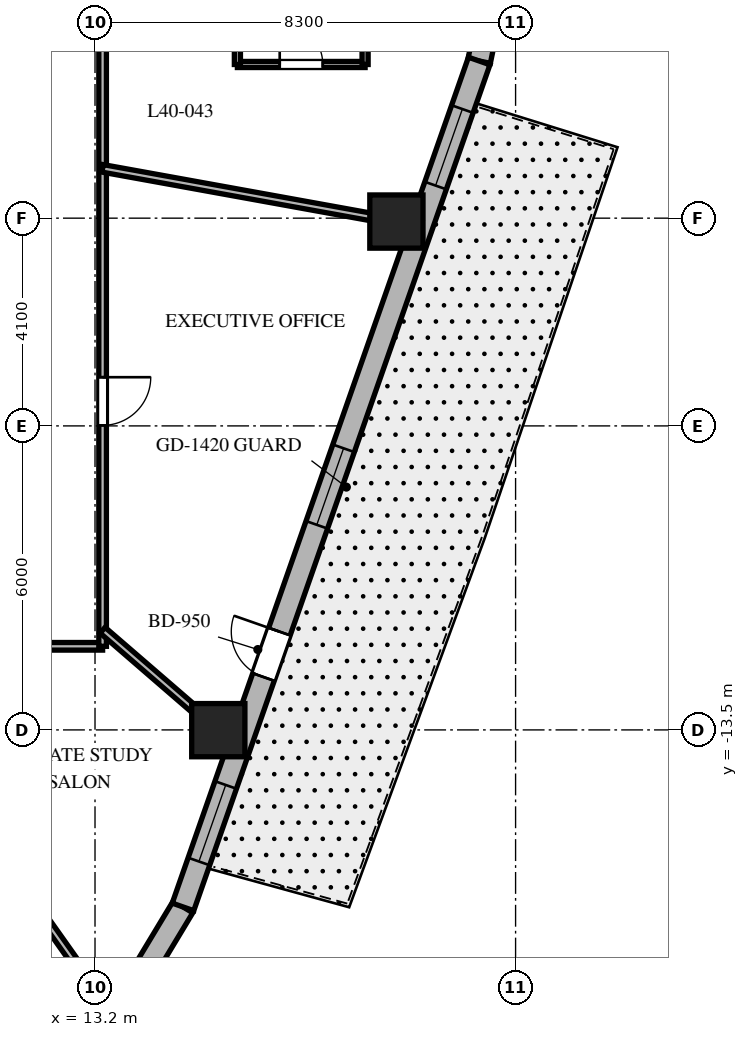
"""IFC4 building model, lengths in metres.
Left out: names, types, materials, properties, quantities, classifications, styles, units other than length and angle.
Written with IfcOpenShell. Run it as: python <this file> out.ifc"""

import sys

from ifc_helpers import new_model, si_unit, direction, frame, frame_2d, origin, origin_2d, place, context, subcontext, project, spatial, rectangle, extrude, element, fill, save


model = new_model("IFC4")
c1 = context("Model", 3, precision=1e-05, world=origin(), true_north=direction((0.0, 1.0)))
c2 = subcontext(c1, "Body", "Model", "MODEL_VIEW")
j1 = project(units=[si_unit("LENGTHUNIT", "METRE"), si_unit("PLANEANGLEUNIT", "RADIAN")], contexts=[c1])
p1 = place(None, origin())
s1 = spatial("IfcSite", under=j1, at=p1, CompositionType="ELEMENT")
p2 = place(p1, origin())
s2 = spatial("IfcBuilding", under=s1, at=p2, CompositionType="ELEMENT")
p3 = place(p2, frame((0.0, 0.0, 162.8)))
s3 = spatial("IfcBuildingStorey", under=s2, at=p3, CompositionType="ELEMENT", Elevation=162.8)
for number, where, z_axis, x_axis in (
    (1, (15.633, -13.505, 0.0), (0.0, 0.0, 1.0), (1.0, 0.0, 0.0)),
    (2, (19.148, -3.467, 0.0), (0.0, 0.0, 1.0), (1.0, 0.0, 0.0)),
):
    element("IfcColumn", number, at=place(p3, frame(where, z_axis=z_axis, x_axis=x_axis)), inside=s3, PredefinedType="COLUMN", context=c2, shape_type="SweptSolid", body=[
        extrude(rectangle(XDim=1.05, YDim=1.05, at=origin_2d()), origin(), (0.0, 0.0, 1.0), 3.7),
    ])
p4 = place(p3, frame((14.214, -18.192, 0.0), z_axis=(0.0, 0.0, 1.0), x_axis=(0.516340945502, 0.856383108193, 0.0)))
e3 = element("IfcWall", 3, at=p4, inside=s3, PredefinedType="SOLIDWALL", context=c2, shape_type="SweptSolid", body=[
    extrude(rectangle(XDim=1.4, YDim=0.45, at=frame_2d((0.7, 0.0))), origin(), (0.0, 0.0, 1.0), 3.4),
])
p5 = place(p3, frame((20.782, -0.298, 0.0), z_axis=(0.0, 0.0, 1.0), x_axis=(0.202570068411, 0.979267771033, 0.0)))
e4 = element("IfcWall", 4, at=p5, inside=s3, PredefinedType="SOLIDWALL", context=c2, shape_type="SweptSolid", body=[
    extrude(rectangle(XDim=0.909, YDim=0.45, at=frame_2d((0.454, 0.0))), origin(), (0.0, 0.0, 1.0), 3.4),
])
p6 = place(p3, frame((14.937, -16.993, 0.0), z_axis=(0.0, 0.0, 1.0), x_axis=(0.330431575061, 0.943829949834, 0.0)))
e5 = element("IfcWall", 5, at=p6, inside=s3, PredefinedType="SOLIDWALL", context=c2, shape_type="SweptSolid", body=[
    extrude(rectangle(XDim=17.689, YDim=0.45, at=frame_2d((8.844, 0.0))), origin(), (0.0, 0.0, 1.0), 3.4),
])
p7 = place(p6, frame((4.807, 0.0, 0.0)))
e6 = element("IfcOpeningElement", 6, at=p7, cuts=e5, PredefinedType="OPENING", context=c2, shape_type="SweptSolid", body=[
    extrude(rectangle(XDim=0.95, YDim=2.15, at=frame_2d((0.475, 1.075))), frame((0.0, 0.235, 0.0), z_axis=(0.0, -1.0, 0.0), x_axis=(1.0, 0.0, 0.0)), (0.0, 0.0, 1.0), 0.47),
])
p8 = place(p6, frame((0.95, 0.0, 0.8)))
e7 = element("IfcOpeningElement", 7, at=p8, cuts=e5, PredefinedType="OPENING", context=c2, shape_type="SweptSolid", body=[
    extrude(rectangle(XDim=1.6, YDim=1.75, at=frame_2d((0.8, 0.875))), frame((0.0, 0.235, 0.0), z_axis=(0.0, -1.0, 0.0), x_axis=(1.0, 0.0, 0.0)), (0.0, 0.0, 1.0), 0.47),
])
p9 = place(p6, frame((7.99, 0.0, 0.8)))
e8 = element("IfcOpeningElement", 8, at=p9, cuts=e5, PredefinedType="OPENING", context=c2, shape_type="SweptSolid", body=[
    extrude(rectangle(XDim=1.6, YDim=1.75, at=frame_2d((0.8, 0.875))), frame((0.0, 0.235, 0.0), z_axis=(0.0, -1.0, 0.0), x_axis=(1.0, 0.0, 0.0)), (0.0, 0.0, 1.0), 0.47),
])
p10 = place(p6, frame((15.084, 0.0, 0.8)))
e9 = element("IfcOpeningElement", 9, at=p10, cuts=e5, PredefinedType="OPENING", context=c2, shape_type="SweptSolid", body=[
    extrude(rectangle(XDim=1.6, YDim=1.75, at=frame_2d((0.8, 0.875))), frame((0.0, 0.235, 0.0), z_axis=(0.0, -1.0, 0.0), x_axis=(1.0, 0.0, 0.0)), (0.0, 0.0, 1.0), 0.47),
])
p11 = place(p3, frame((13.35, -11.85, 0.0), z_axis=(0.0, 0.0, 1.0), x_axis=(-1.0, 0.0, 0.0)))
e10 = element("IfcWall", 10, at=p11, inside=s3, PredefinedType="PARTITIONING", context=c2, shape_type="SweptSolid", body=[
    extrude(rectangle(XDim=26.7, YDim=0.15, at=frame_2d((13.35, 0.0))), origin(), (0.0, 0.0, 1.0), 2.84),
])
p12 = place(p11, frame((20.682, 0.0, 0.0)))
e11 = element("IfcOpeningElement", 11, at=p12, cuts=e10, PredefinedType="OPENING", context=c2, shape_type="SweptSolid", body=[
    extrude(rectangle(XDim=0.95, YDim=2.03, at=frame_2d((0.475, 1.015))), frame((0.0, 0.085, 0.0), z_axis=(0.0, -1.0, 0.0), x_axis=(1.0, 0.0, 0.0)), (0.0, 0.0, 1.0), 0.17),
])
p13 = place(p11, frame((14.708, 0.0, 0.0)))
e12 = element("IfcOpeningElement", 12, at=p13, cuts=e10, PredefinedType="OPENING", context=c2, shape_type="SweptSolid", body=[
    extrude(rectangle(XDim=0.95, YDim=2.03, at=frame_2d((0.475, 1.015))), frame((0.0, 0.085, 0.0), z_axis=(0.0, -1.0, 0.0), x_axis=(1.0, 0.0, 0.0)), (0.0, 0.0, 1.0), 0.17),
])
p14 = place(p11, frame((10.553, 0.0, 0.0)))
e13 = element("IfcOpeningElement", 13, at=p14, cuts=e10, PredefinedType="OPENING", context=c2, shape_type="SweptSolid", body=[
    extrude(rectangle(XDim=0.95, YDim=2.03, at=frame_2d((0.475, 1.015))), frame((0.0, 0.085, 0.0), z_axis=(0.0, -1.0, 0.0), x_axis=(1.0, 0.0, 0.0)), (0.0, 0.0, 1.0), 0.17),
])
p15 = place(p11, frame((6.353, 0.0, 0.0)))
e14 = element("IfcOpeningElement", 14, at=p15, cuts=e10, PredefinedType="OPENING", context=c2, shape_type="SweptSolid", body=[
    extrude(rectangle(XDim=0.9, YDim=2.03, at=frame_2d((0.45, 1.015))), frame((0.0, 0.085, 0.0), z_axis=(0.0, -1.0, 0.0), x_axis=(1.0, 0.0, 0.0)), (0.0, 0.0, 1.0), 0.17),
])
p16 = place(p11, frame((2.15, 0.0, 0.0)))
e15 = element("IfcOpeningElement", 15, at=p16, cuts=e10, PredefinedType="OPENING", context=c2, shape_type="SweptSolid", body=[
    extrude(rectangle(XDim=0.9, YDim=2.03, at=frame_2d((0.45, 1.015))), frame((0.0, 0.085, 0.0), z_axis=(0.0, -1.0, 0.0), x_axis=(1.0, 0.0, 0.0)), (0.0, 0.0, 1.0), 0.17),
])
p17 = place(p3, frame((13.35, 11.85, 0.0), z_axis=(0.0, 0.0, 1.0), x_axis=(0.0, -1.0, 0.0)))
e16 = element("IfcWall", 16, at=p17, inside=s3, PredefinedType="PARTITIONING", context=c2, shape_type="SweptSolid", body=[
    extrude(rectangle(XDim=23.7, YDim=0.15, at=frame_2d((11.85, 0.0))), origin(), (0.0, 0.0, 1.0), 2.84),
])
p18 = place(p17, frame((5.652, 0.0, 0.0)))
e17 = element("IfcOpeningElement", 17, at=p18, cuts=e16, PredefinedType="OPENING", context=c2, shape_type="SweptSolid", body=[
    extrude(rectangle(XDim=0.95, YDim=2.03, at=frame_2d((0.475, 1.015))), frame((0.0, 0.085, 0.0), z_axis=(0.0, -1.0, 0.0), x_axis=(1.0, 0.0, 0.0)), (0.0, 0.0, 1.0), 0.17),
])
p19 = place(p17, frame((1.721, 0.0, 0.0)))
e18 = element("IfcOpeningElement", 18, at=p19, cuts=e16, PredefinedType="OPENING", context=c2, shape_type="SweptSolid", body=[
    extrude(rectangle(XDim=0.9, YDim=2.03, at=frame_2d((0.45, 1.015))), frame((0.0, 0.085, 0.0), z_axis=(0.0, -1.0, 0.0), x_axis=(1.0, 0.0, 0.0)), (0.0, 0.0, 1.0), 0.17),
])
p20 = place(p17, frame((18.389, 0.0, 0.0)))
e19 = element("IfcOpeningElement", 19, at=p20, cuts=e16, PredefinedType="OPENING", context=c2, shape_type="SweptSolid", body=[
    extrude(rectangle(XDim=0.95, YDim=2.03, at=frame_2d((0.475, 1.015))), frame((0.0, 0.085, 0.0), z_axis=(0.0, -1.0, 0.0), x_axis=(1.0, 0.0, 0.0)), (0.0, 0.0, 1.0), 0.17),
])
p21 = place(p17, frame((10.751, 0.0, 0.0)))
e20 = element("IfcOpeningElement", 20, at=p21, cuts=e16, PredefinedType="OPENING", context=c2, shape_type="SweptSolid", body=[
    extrude(rectangle(XDim=0.95, YDim=2.03, at=frame_2d((0.475, 1.015))), frame((0.0, 0.085, 0.0), z_axis=(0.0, -1.0, 0.0), x_axis=(1.0, 0.0, 0.0)), (0.0, 0.0, 1.0), 0.17),
])
p22 = place(p3, frame((8.39, -11.85, 0.0), z_axis=(0.0, 0.0, 1.0), x_axis=(0.577877530264, -0.816123495566, 0.0)))
e21 = element("IfcWall", 21, at=p22, inside=s3, PredefinedType="PARTITIONING", context=c2, shape_type="SweptSolid", body=[
    extrude(rectangle(XDim=8.382, YDim=0.15, at=frame_2d((4.191, 0.0))), origin(), (0.0, 0.0, 1.0), 2.64),
])
p23 = place(p3, frame((13.35, -11.533, 0.0), z_axis=(0.0, 0.0, 1.0), x_axis=(0.756711647314, -0.65374879183, 0.0)))
e22 = element("IfcWall", 22, at=p23, inside=s3, PredefinedType="PARTITIONING", context=c2, shape_type="SweptSolid", body=[
    extrude(rectangle(XDim=3.55, YDim=0.15, at=frame_2d((1.775, 0.0))), origin(), (0.0, 0.0, 1.0), 2.64),
])
p24 = place(p3, frame((13.35, -2.417, 0.0), z_axis=(0.0, 0.0, 1.0), x_axis=(0.98399796473, -0.178179699761, 0.0)))
e23 = element("IfcWall", 23, at=p24, inside=s3, PredefinedType="PARTITIONING", context=c2, shape_type="SweptSolid", body=[
    extrude(rectangle(XDim=6.393, YDim=0.15, at=frame_2d((3.197, 0.0))), origin(), (0.0, 0.0, 1.0), 2.64),
])
p25 = place(p3, frame((16.01, -0.367, 0.0), z_axis=(0.0, 0.0, 1.0), x_axis=(1.0, 0.0, 0.0)))
e24 = element("IfcWall", 24, at=p25, inside=s3, PredefinedType="PARTITIONING", context=c2, shape_type="SweptSolid", body=[
    extrude(rectangle(XDim=2.52, YDim=0.12, at=frame_2d((1.26, 0.0))), origin(), (0.0, 0.0, 1.0), 3.4),
])
p26 = place(p25, frame((0.835, 0.0, 0.0)))
e25 = element("IfcOpeningElement", 25, at=p26, cuts=e24, PredefinedType="OPENING", context=c2, shape_type="SweptSolid", body=[
    extrude(rectangle(XDim=0.85, YDim=2.03, at=frame_2d((0.425, 1.015))), frame((0.0, 0.07, 0.0), z_axis=(0.0, -1.0, 0.0), x_axis=(1.0, 0.0, 0.0)), (0.0, 0.0, 1.0), 0.14),
])
p27 = place(p3, frame((18.53, -0.367, 0.0), z_axis=(0.0, 0.0, 1.0), x_axis=(0.0, 1.0, 0.0)))
e26 = element("IfcWall", 26, at=p27, inside=s3, PredefinedType="PARTITIONING", context=c2, shape_type="SweptSolid", body=[
    extrude(rectangle(XDim=2.68, YDim=0.12, at=frame_2d((1.34, 0.0))), origin(), (0.0, 0.0, 1.0), 2.64),
])
p28 = place(p3, frame((16.01, 2.313, 0.0), z_axis=(0.0, 0.0, 1.0), x_axis=(0.0, -1.0, 0.0)))
e27 = element("IfcWall", 27, at=p28, inside=s3, PredefinedType="PARTITIONING", context=c2, shape_type="SweptSolid", body=[
    extrude(rectangle(XDim=2.68, YDim=0.12, at=frame_2d((1.34, 0.0))), origin(), (0.0, 0.0, 1.0), 3.4),
])
p29 = place(p7, origin())
e28 = element("IfcDoor", 28, at=p29, inside=s3, OperationType="SINGLE_SWING_RIGHT", PredefinedType="DOOR", context=c2, shape_type="SweptSolid", body=[
    extrude(rectangle(XDim=0.95, YDim=2.15, at=frame_2d((0.475, 1.075))), frame((0.0, 0.025, 0.0), z_axis=(0.0, -1.0, 0.0), x_axis=(1.0, 0.0, 0.0)), (0.0, 0.0, 1.0), 0.05),
])
fill(e6, e28)
p30 = place(p8, origin())
e29 = element("IfcWindow", 29, at=p30, inside=s3, PartitioningType="SINGLE_PANEL", PredefinedType="WINDOW", context=c2, shape_type="SweptSolid", body=[
    extrude(rectangle(XDim=1.6, YDim=1.75, at=frame_2d((0.8, 0.875))), frame((0.0, 0.03, 0.0), z_axis=(0.0, -1.0, 0.0), x_axis=(1.0, 0.0, 0.0)), (0.0, 0.0, 1.0), 0.06),
])
fill(e7, e29)
p31 = place(p9, origin())
e30 = element("IfcWindow", 30, at=p31, inside=s3, PartitioningType="SINGLE_PANEL", PredefinedType="WINDOW", context=c2, shape_type="SweptSolid", body=[
    extrude(rectangle(XDim=1.6, YDim=1.75, at=frame_2d((0.8, 0.875))), frame((0.0, 0.03, 0.0), z_axis=(0.0, -1.0, 0.0), x_axis=(1.0, 0.0, 0.0)), (0.0, 0.0, 1.0), 0.06),
])
fill(e8, e30)
p32 = place(p10, origin())
e31 = element("IfcWindow", 31, at=p32, inside=s3, PartitioningType="SINGLE_PANEL", PredefinedType="WINDOW", context=c2, shape_type="SweptSolid", body=[
    extrude(rectangle(XDim=1.6, YDim=1.75, at=frame_2d((0.8, 0.875))), frame((0.0, 0.03, 0.0), z_axis=(0.0, -1.0, 0.0), x_axis=(1.0, 0.0, 0.0)), (0.0, 0.0, 1.0), 0.06),
])
fill(e9, e31)
p33 = place(p20, origin())
e32 = element("IfcDoor", 32, at=p33, inside=s3, OperationType="SINGLE_SWING_LEFT", PredefinedType="DOOR", context=c2, shape_type="SweptSolid", body=[
    extrude(rectangle(XDim=0.95, YDim=2.03, at=frame_2d((0.475, 1.015))), frame((0.0, 0.025, 0.0), z_axis=(0.0, -1.0, 0.0), x_axis=(1.0, 0.0, 0.0)), (0.0, 0.0, 1.0), 0.05),
])
fill(e19, e32)
p34 = place(p26, origin())
e33 = element("IfcDoor", 33, at=p34, inside=s3, OperationType="SINGLE_SWING_LEFT", PredefinedType="DOOR", context=c2, shape_type="SweptSolid", body=[
    extrude(rectangle(XDim=0.85, YDim=2.03, at=frame_2d((0.425, 1.015))), frame((0.0, 0.025, 0.0), z_axis=(0.0, -1.0, 0.0), x_axis=(1.0, 0.0, 0.0)), (0.0, 0.0, 1.0), 0.05),
])
fill(e25, e33)
save(model, sys.argv[1])
